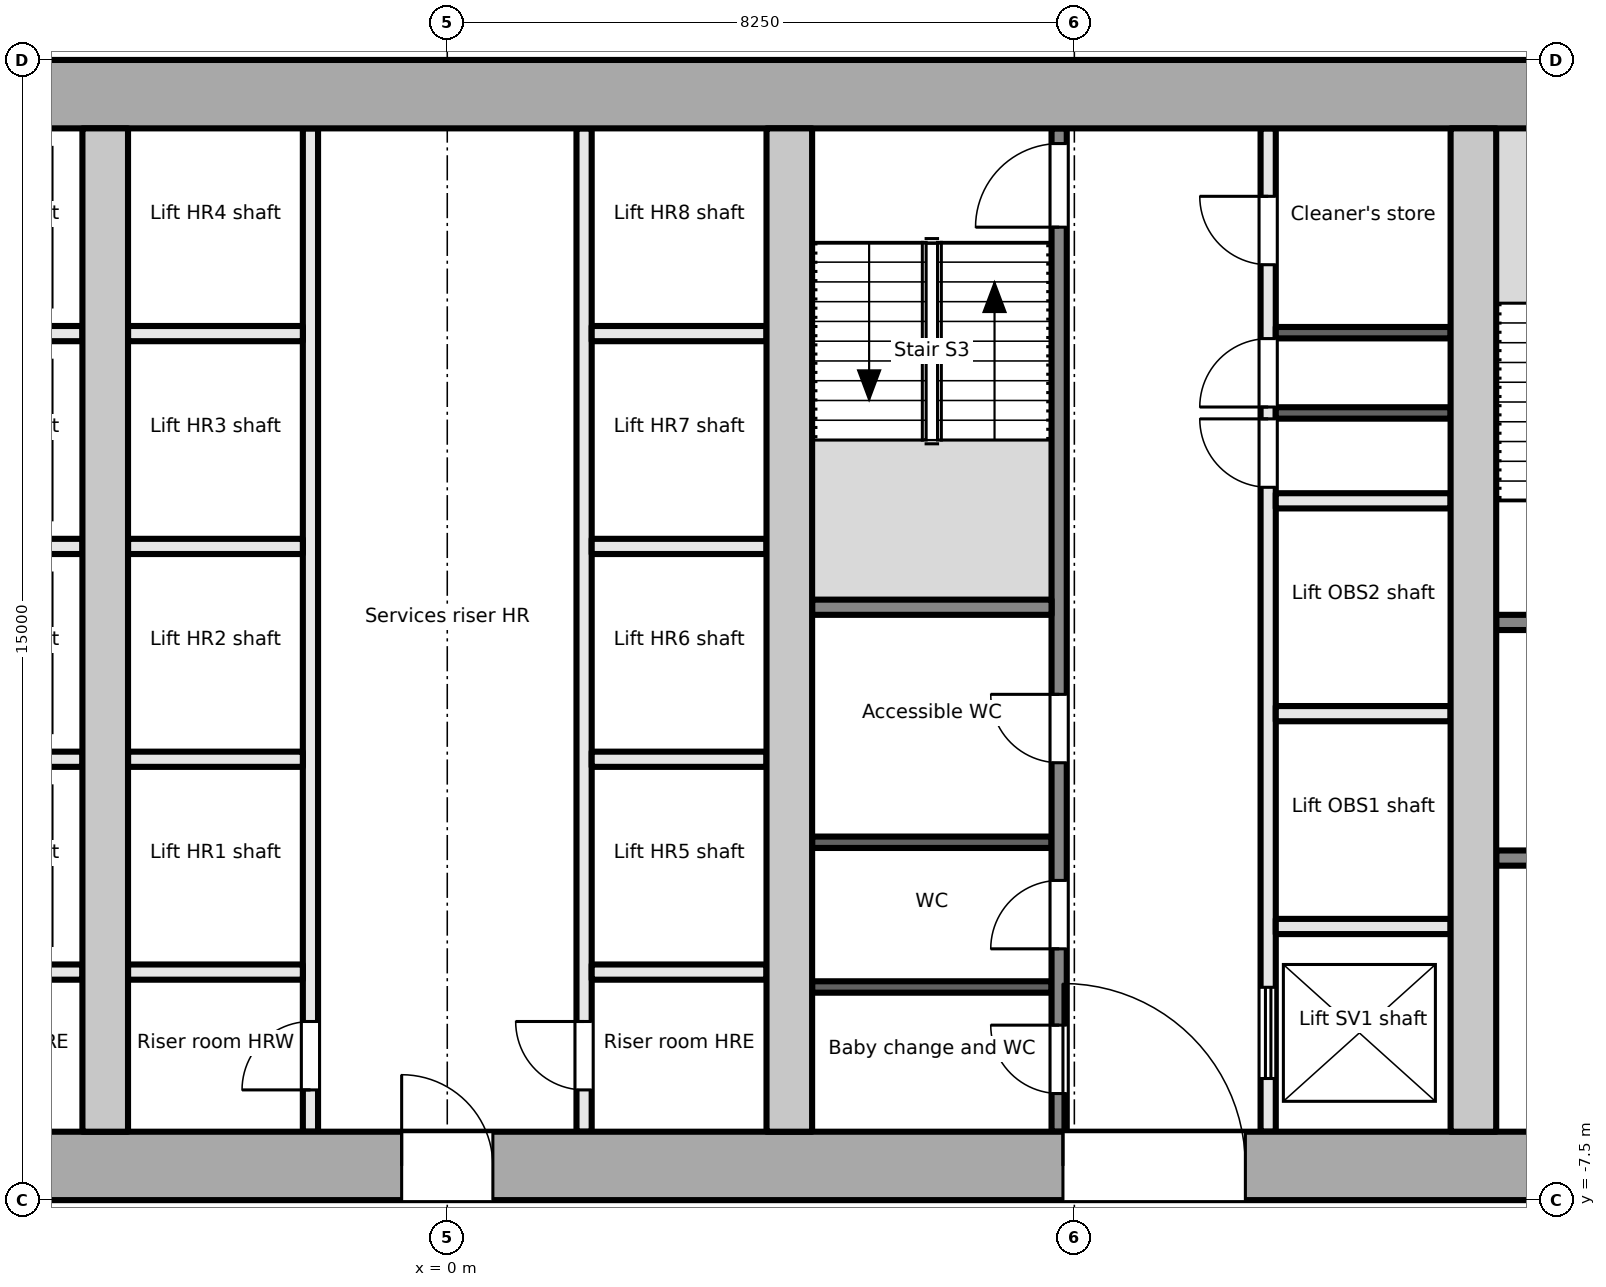
"""IFC4 building model, lengths in metres.
Left out: names, types, materials, properties, quantities, classifications, styles, units other than length and angle.
Written with IfcOpenShell. Run it as: python <this file> out.ifc"""

import sys

from ifc_helpers import new_model, si_unit, direction, frame, frame_2d, origin, place, context, subcontext, project, spatial, rectangle, extrude, element, fill, save


model = new_model("IFC4")
c1 = context("Model", 3, precision=1e-05, world=origin(), true_north=direction((0.0, 1.0)))
c2 = subcontext(c1, "Body", "Model", "MODEL_VIEW")
j1 = project(units=[si_unit("LENGTHUNIT", "METRE"), si_unit("PLANEANGLEUNIT", "RADIAN")], contexts=[c1])
p1 = place(None, origin())
s1 = spatial("IfcSite", under=j1, at=p1, CompositionType="ELEMENT")
p2 = place(p1, origin())
s2 = spatial("IfcBuilding", under=s1, at=p2, CompositionType="ELEMENT")
p3 = place(p2, frame((0.0, 0.0, 48.8)))
s3 = spatial("IfcBuildingStorey", under=s2, at=p3, CompositionType="ELEMENT", Elevation=48.8)
p4 = place(p3, frame((-18.0, -7.05, -0.2), z_axis=(0.0, 0.0, 1.0), x_axis=(1.0, 0.0, 0.0)))
e1 = element("IfcWall", 1, at=p4, inside=s3, PredefinedType="SHEAR", context=c2, shape_type="SweptSolid", body=[
    extrude(rectangle(XDim=36.0, YDim=0.9, at=frame_2d((18.0, 0.0))), origin(), (0.0, 0.0, 1.0), 4.1),
])
p5 = place(p4, frame((7.8, 0.0, 0.2)))
e2 = element("IfcOpeningElement", 2, at=p5, cuts=e1, PredefinedType="OPENING", context=c2, shape_type="SweptSolid", body=[
    extrude(rectangle(XDim=2.4, YDim=2.1, at=frame_2d((1.2, 1.05))), frame((0.0, 0.46, 0.0), z_axis=(0.0, -1.0, 0.0), x_axis=(1.0, 0.0, 0.0)), (0.0, 0.0, 1.0), 0.921),
])
p6 = place(p4, frame((17.4, 0.0, 0.2)))
e3 = element("IfcOpeningElement", 3, at=p6, cuts=e1, PredefinedType="OPENING", context=c2, shape_type="SweptSolid", body=[
    extrude(rectangle(XDim=1.2, YDim=2.1, at=frame_2d((0.6, 1.05))), frame((0.0, 0.46, 0.0), z_axis=(0.0, -1.0, 0.0), x_axis=(1.0, 0.0, 0.0)), (0.0, 0.0, 1.0), 0.921),
])
p7 = place(p4, frame((26.1, 0.0, 0.2)))
e4 = element("IfcOpeningElement", 4, at=p7, cuts=e1, PredefinedType="OPENING", context=c2, shape_type="SweptSolid", body=[
    extrude(rectangle(XDim=2.4, YDim=2.1, at=frame_2d((1.2, 1.05))), frame((0.0, 0.46, 0.0), z_axis=(0.0, -1.0, 0.0), x_axis=(1.0, 0.0, 0.0)), (0.0, 0.0, 1.0), 0.921),
])
p8 = place(p3, frame((-18.0, 7.05, -0.2), z_axis=(0.0, 0.0, 1.0), x_axis=(1.0, 0.0, 0.0)))
e5 = element("IfcWall", 5, at=p8, inside=s3, PredefinedType="SHEAR", context=c2, shape_type="SweptSolid", body=[
    extrude(rectangle(XDim=36.0, YDim=0.9, at=frame_2d((18.0, 0.0))), origin(), (0.0, 0.0, 1.0), 4.1),
])
for number, where, z_axis, x_axis in (
    (6, (-4.5, -6.6, -0.2), (0.0, 0.0, 1.0), (0.0, 1.0, 0.0)),
    (7, (4.5, -6.6, -0.2), (0.0, 0.0, 1.0), (0.0, 1.0, 0.0)),
    (8, (13.5, -6.6, -0.2), (0.0, 0.0, 1.0), (0.0, 1.0, 0.0)),
):
    element("IfcWall", number, at=place(p3, frame(where, z_axis=z_axis, x_axis=x_axis)), inside=s3, PredefinedType="SHEAR", context=c2, shape_type="SweptSolid", body=[
        extrude(rectangle(XDim=13.2, YDim=0.6, at=frame_2d((6.6, 0.0))), origin(), (0.0, 0.0, 1.0), 4.1),
    ])
p9 = place(p3, frame((13.8, -3.0, 0.0), z_axis=(0.0, 0.0, 1.0), x_axis=(1.0, 0.0, 0.0)))
e9 = element("IfcWall", 9, at=p9, inside=s3, PredefinedType="PARTITIONING", context=c2, shape_type="SweptSolid", body=[
    extrude(rectangle(XDim=3.3, YDim=0.2, at=frame_2d((1.65, 0.0))), origin(), (0.0, 0.0, 1.0), 3.9),
])
p10 = place(p9, frame((1.1, 0.0, 0.0)))
e10 = element("IfcOpeningElement", 10, at=p10, cuts=e9, PredefinedType="OPENING", context=c2, shape_type="SweptSolid", body=[
    extrude(rectangle(XDim=1.1, YDim=2.1, at=frame_2d((0.55, 1.05))), frame((0.0, 0.111, 0.0), z_axis=(0.0, -1.0, 0.0), x_axis=(1.0, 0.0, 0.0)), (0.0, 0.0, 1.0), 0.221),
])
p11 = place(p3, frame((13.8, 0.1, 0.0), z_axis=(0.0, 0.0, 1.0), x_axis=(1.0, 0.0, 0.0)))
e11 = element("IfcWall", 11, at=p11, inside=s3, PredefinedType="PARTITIONING", context=c2, shape_type="SweptSolid", body=[
    extrude(rectangle(XDim=3.3, YDim=0.2, at=frame_2d((1.65, 0.0))), origin(), (0.0, 0.0, 1.0), 3.9),
])
p12 = place(p11, frame((1.1, 0.0, 0.0)))
e12 = element("IfcOpeningElement", 12, at=p12, cuts=e11, PredefinedType="OPENING", context=c2, shape_type="SweptSolid", body=[
    extrude(rectangle(XDim=1.1, YDim=2.1, at=frame_2d((0.55, 1.05))), frame((0.0, 0.111, 0.0), z_axis=(0.0, -1.0, 0.0), x_axis=(1.0, 0.0, 0.0)), (0.0, 0.0, 1.0), 0.221),
])
for number, where, z_axis, x_axis in (
    (13, (-7.1, -1.7, 0.0), (0.0, 0.0, 1.0), (1.0, 0.0, 0.0)),
    (14, (-7.1, 1.1, 0.0), (0.0, 0.0, 1.0), (1.0, 0.0, 0.0)),
    (15, (-7.1, 3.9, 0.0), (0.0, 0.0, 1.0), (1.0, 0.0, 0.0)),
    (16, (-7.1, -4.5, 0.0), (0.0, 0.0, 1.0), (1.0, 0.0, 0.0)),
):
    element("IfcWall", number, at=place(p3, frame(where, z_axis=z_axis, x_axis=x_axis)), inside=s3, PredefinedType="PARTITIONING", context=c2, shape_type="SweptSolid", body=[
        extrude(rectangle(XDim=2.3, YDim=0.2, at=frame_2d((1.15, 0.0))), origin(), (0.0, 0.0, 1.0), 3.9),
    ])
p13 = place(p3, frame((-1.8, -6.6, 0.0), z_axis=(0.0, 0.0, 1.0), x_axis=(0.0, 1.0, 0.0)))
e17 = element("IfcWall", 17, at=p13, inside=s3, PredefinedType="PARTITIONING", context=c2, shape_type="SweptSolid", body=[
    extrude(rectangle(XDim=13.2, YDim=0.2, at=frame_2d((6.6, 0.0))), origin(), (0.0, 0.0, 1.0), 3.9),
])
p14 = place(p13, frame((0.55, 0.0, 0.0)))
e18 = element("IfcOpeningElement", 18, at=p14, cuts=e17, PredefinedType="OPENING", context=c2, shape_type="SweptSolid", body=[
    extrude(rectangle(XDim=0.9, YDim=2.1, at=frame_2d((0.45, 1.05))), frame((0.0, 0.111, 0.0), z_axis=(0.0, -1.0, 0.0), x_axis=(1.0, 0.0, 0.0)), (0.0, 0.0, 1.0), 0.221),
])
p15 = place(p3, frame((1.8, -6.6, 0.0), z_axis=(0.0, 0.0, 1.0), x_axis=(0.0, 1.0, 0.0)))
e19 = element("IfcWall", 19, at=p15, inside=s3, PredefinedType="PARTITIONING", context=c2, shape_type="SweptSolid", body=[
    extrude(rectangle(XDim=13.2, YDim=0.2, at=frame_2d((6.6, 0.0))), origin(), (0.0, 0.0, 1.0), 3.9),
])
p16 = place(p15, frame((0.55, 0.0, 0.0)))
e20 = element("IfcOpeningElement", 20, at=p16, cuts=e19, PredefinedType="OPENING", context=c2, shape_type="SweptSolid", body=[
    extrude(rectangle(XDim=0.9, YDim=2.1, at=frame_2d((0.45, 1.05))), frame((0.0, 0.111, 0.0), z_axis=(0.0, -1.0, 0.0), x_axis=(1.0, 0.0, 0.0)), (0.0, 0.0, 1.0), 0.221),
])
for number, where, z_axis, x_axis in (
    (21, (-4.2, -1.7, 0.0), (0.0, 0.0, 1.0), (1.0, 0.0, 0.0)),
    (22, (-4.2, 1.1, 0.0), (0.0, 0.0, 1.0), (1.0, 0.0, 0.0)),
    (23, (-4.2, 3.9, 0.0), (0.0, 0.0, 1.0), (1.0, 0.0, 0.0)),
    (24, (-4.2, -4.5, 0.0), (0.0, 0.0, 1.0), (1.0, 0.0, 0.0)),
    (25, (1.9, -1.7, 0.0), (0.0, 0.0, 1.0), (1.0, 0.0, 0.0)),
    (26, (1.9, 1.1, 0.0), (0.0, 0.0, 1.0), (1.0, 0.0, 0.0)),
    (27, (1.9, 3.9, 0.0), (0.0, 0.0, 1.0), (1.0, 0.0, 0.0)),
    (28, (1.9, -4.5, 0.0), (0.0, 0.0, 1.0), (1.0, 0.0, 0.0)),
):
    element("IfcWall", number, at=place(p3, frame(where, z_axis=z_axis, x_axis=x_axis)), inside=s3, PredefinedType="PARTITIONING", context=c2, shape_type="SweptSolid", body=[
        extrude(rectangle(XDim=2.3, YDim=0.2, at=frame_2d((1.15, 0.0))), origin(), (0.0, 0.0, 1.0), 3.9),
    ])
p17 = place(p3, frame((8.05, -6.6, 0.0), z_axis=(0.0, 0.0, 1.0), x_axis=(0.0, 1.0, 0.0)))
e29 = element("IfcWall", 29, at=p17, inside=s3, PredefinedType="PARTITIONING", context=c2, shape_type="SweptSolid", body=[
    extrude(rectangle(XDim=13.2, YDim=0.2, at=frame_2d((6.6, 0.0))), origin(), (0.0, 0.0, 1.0), 3.9),
])
p18 = place(p17, frame((0.502, 0.0, 0.0)))
e30 = element("IfcOpeningElement", 30, at=p18, cuts=e29, PredefinedType="OPENING", context=c2, shape_type="SweptSolid", body=[
    extrude(rectangle(XDim=0.9, YDim=2.1, at=frame_2d((0.45, 1.05))), frame((0.0, 0.111, 0.0), z_axis=(0.0, -1.0, 0.0), x_axis=(1.0, 0.0, 0.0)), (0.0, 0.0, 1.0), 0.221),
])
p19 = place(p17, frame((2.406, 0.0, 0.0)))
e31 = element("IfcOpeningElement", 31, at=p19, cuts=e29, PredefinedType="OPENING", context=c2, shape_type="SweptSolid", body=[
    extrude(rectangle(XDim=0.9, YDim=2.1, at=frame_2d((0.45, 1.05))), frame((0.0, 0.111, 0.0), z_axis=(0.0, -1.0, 0.0), x_axis=(1.0, 0.0, 0.0)), (0.0, 0.0, 1.0), 0.221),
])
p20 = place(p17, frame((4.854, 0.0, 0.0)))
e32 = element("IfcOpeningElement", 32, at=p20, cuts=e29, PredefinedType="OPENING", context=c2, shape_type="SweptSolid", body=[
    extrude(rectangle(XDim=0.9, YDim=2.1, at=frame_2d((0.45, 1.05))), frame((0.0, 0.111, 0.0), z_axis=(0.0, -1.0, 0.0), x_axis=(1.0, 0.0, 0.0)), (0.0, 0.0, 1.0), 0.221),
])
p21 = place(p17, frame((11.9, 0.0, 0.0)))
e33 = element("IfcOpeningElement", 33, at=p21, cuts=e29, PredefinedType="OPENING", context=c2, shape_type="SweptSolid", body=[
    extrude(rectangle(XDim=1.1, YDim=2.1, at=frame_2d((0.55, 1.05))), frame((0.0, 0.111, 0.0), z_axis=(0.0, -1.0, 0.0), x_axis=(1.0, 0.0, 0.0)), (0.0, 0.0, 1.0), 0.221),
])
p22 = place(p3, frame((10.8, -6.6, 0.0), z_axis=(0.0, 0.0, 1.0), x_axis=(0.0, 1.0, 0.0)))
e34 = element("IfcWall", 34, at=p22, inside=s3, PredefinedType="PARTITIONING", context=c2, shape_type="SweptSolid", body=[
    extrude(rectangle(XDim=13.2, YDim=0.2, at=frame_2d((6.6, 0.0))), origin(), (0.0, 0.0, 1.0), 3.9),
])
p23 = place(p22, frame((0.7, 0.0, 0.0)))
e35 = element("IfcOpeningElement", 35, at=p23, cuts=e34, PredefinedType="OPENING", context=c2, shape_type="SweptSolid", body=[
    extrude(rectangle(XDim=1.2, YDim=2.1, at=frame_2d((0.6, 1.05))), frame((0.0, 0.111, 0.0), z_axis=(0.0, -1.0, 0.0), x_axis=(1.0, 0.0, 0.0)), (0.0, 0.0, 1.0), 0.221),
])
p24 = place(p22, frame((8.478, 0.0, 0.0)))
e36 = element("IfcOpeningElement", 36, at=p24, cuts=e34, PredefinedType="OPENING", context=c2, shape_type="SweptSolid", body=[
    extrude(rectangle(XDim=0.9, YDim=2.1, at=frame_2d((0.45, 1.05))), frame((0.0, 0.111, 0.0), z_axis=(0.0, -1.0, 0.0), x_axis=(1.0, 0.0, 0.0)), (0.0, 0.0, 1.0), 0.221),
])
p25 = place(p22, frame((9.534, 0.0, 0.0)))
e37 = element("IfcOpeningElement", 37, at=p25, cuts=e34, PredefinedType="OPENING", context=c2, shape_type="SweptSolid", body=[
    extrude(rectangle(XDim=0.9, YDim=2.1, at=frame_2d((0.45, 1.05))), frame((0.0, 0.111, 0.0), z_axis=(0.0, -1.0, 0.0), x_axis=(1.0, 0.0, 0.0)), (0.0, 0.0, 1.0), 0.221),
])
p26 = place(p22, frame((11.406, 0.0, 0.0)))
e38 = element("IfcOpeningElement", 38, at=p26, cuts=e34, PredefinedType="OPENING", context=c2, shape_type="SweptSolid", body=[
    extrude(rectangle(XDim=0.9, YDim=2.1, at=frame_2d((0.45, 1.05))), frame((0.0, 0.111, 0.0), z_axis=(0.0, -1.0, 0.0), x_axis=(1.0, 0.0, 0.0)), (0.0, 0.0, 1.0), 0.221),
])
p27 = place(p3, frame((4.8, 0.3, 0.0), z_axis=(0.0, 0.0, 1.0), x_axis=(1.0, 0.0, 0.0)))
e39 = element("IfcWall", 39, at=p27, inside=s3, PredefinedType="PARTITIONING", context=c2, shape_type="SweptSolid", body=[
    extrude(rectangle(XDim=3.15, YDim=0.2, at=frame_2d((1.575, 0.0))), origin(), (0.0, 0.0, 1.0), 3.9),
])
for number, where, z_axis, x_axis in (
    (40, (4.8, -4.696, 0.0), (0.0, 0.0, 1.0), (1.0, 0.0, 0.0)),
    (41, (4.8, -2.792, 0.0), (0.0, 0.0, 1.0), (1.0, 0.0, 0.0)),
):
    element("IfcWall", number, at=place(p3, frame(where, z_axis=z_axis, x_axis=x_axis)), inside=s3, PredefinedType="PARTITIONING", context=c2, shape_type="SweptSolid", body=[
        extrude(rectangle(XDim=3.15, YDim=0.15, at=frame_2d((1.575, 0.0))), origin(), (0.0, 0.0, 1.0), 3.9),
    ])
for number, where, z_axis, x_axis in (
    (42, (10.9, -3.9, 0.0), (0.0, 0.0, 1.0), (1.0, 0.0, 0.0)),
    (43, (10.9, -1.1, 0.0), (0.0, 0.0, 1.0), (1.0, 0.0, 0.0)),
    (44, (10.9, 1.7, 0.0), (0.0, 0.0, 1.0), (1.0, 0.0, 0.0)),
):
    element("IfcWall", number, at=place(p3, frame(where, z_axis=z_axis, x_axis=x_axis)), inside=s3, PredefinedType="PARTITIONING", context=c2, shape_type="SweptSolid", body=[
        extrude(rectangle(XDim=2.3, YDim=0.2, at=frame_2d((1.15, 0.0))), origin(), (0.0, 0.0, 1.0), 3.9),
    ])
for number, where, z_axis, x_axis in (
    (45, (10.9, 2.856, 0.0), (0.0, 0.0, 1.0), (1.0, 0.0, 0.0)),
    (46, (10.9, 3.912, 0.0), (0.0, 0.0, 1.0), (1.0, 0.0, 0.0)),
):
    element("IfcWall", number, at=place(p3, frame(where, z_axis=z_axis, x_axis=x_axis)), inside=s3, PredefinedType="PARTITIONING", context=c2, shape_type="SweptSolid", body=[
        extrude(rectangle(XDim=2.3, YDim=0.15, at=frame_2d((1.15, 0.0))), origin(), (0.0, 0.0, 1.0), 3.9),
    ])
p28 = place(p14, origin())
e47 = element("IfcDoor", 47, at=p28, inside=s3, OperationType="SINGLE_SWING_LEFT", PredefinedType="DOOR", context=c2, shape_type="SweptSolid", body=[
    extrude(rectangle(XDim=0.9, YDim=2.1, at=frame_2d((0.45, 1.05))), frame((0.0, 0.025, 0.0), z_axis=(0.0, -1.0, 0.0), x_axis=(1.0, 0.0, 0.0)), (0.0, 0.0, 1.0), 0.05),
])
fill(e18, e47)
p29 = place(p16, origin())
e48 = element("IfcDoor", 48, at=p29, inside=s3, OperationType="SINGLE_SWING_RIGHT", PredefinedType="DOOR", context=c2, shape_type="SweptSolid", body=[
    extrude(rectangle(XDim=0.9, YDim=2.1, at=frame_2d((0.45, 1.05))), frame((0.0, 0.025, 0.0), z_axis=(0.0, -1.0, 0.0), x_axis=(1.0, 0.0, 0.0)), (0.0, 0.0, 1.0), 0.05),
])
fill(e20, e48)
p30 = place(p6, origin())
e49 = element("IfcDoor", 49, at=p30, inside=s3, OperationType="SINGLE_SWING_LEFT", PredefinedType="DOOR", context=c2, shape_type="SweptSolid", body=[
    extrude(rectangle(XDim=1.2, YDim=2.1, at=frame_2d((0.6, 1.05))), frame((0.0, 0.025, 0.0), z_axis=(0.0, -1.0, 0.0), x_axis=(1.0, 0.0, 0.0)), (0.0, 0.0, 1.0), 0.05),
])
fill(e3, e49)
p31 = place(p18, origin())
e50 = element("IfcDoor", 50, at=p31, inside=s3, OperationType="SINGLE_SWING_RIGHT", PredefinedType="DOOR", context=c2, shape_type="SweptSolid", body=[
    extrude(rectangle(XDim=0.9, YDim=2.1, at=frame_2d((0.45, 1.05))), frame((0.0, 0.025, 0.0), z_axis=(0.0, -1.0, 0.0), x_axis=(1.0, 0.0, 0.0)), (0.0, 0.0, 1.0), 0.05),
])
fill(e30, e50)
p32 = place(p19, origin())
e51 = element("IfcDoor", 51, at=p32, inside=s3, OperationType="SINGLE_SWING_LEFT", PredefinedType="DOOR", context=c2, shape_type="SweptSolid", body=[
    extrude(rectangle(XDim=0.9, YDim=2.1, at=frame_2d((0.45, 1.05))), frame((0.0, 0.025, 0.0), z_axis=(0.0, -1.0, 0.0), x_axis=(1.0, 0.0, 0.0)), (0.0, 0.0, 1.0), 0.05),
])
fill(e31, e51)
p33 = place(p20, origin())
e52 = element("IfcDoor", 52, at=p33, inside=s3, OperationType="SINGLE_SWING_RIGHT", PredefinedType="DOOR", context=c2, shape_type="SweptSolid", body=[
    extrude(rectangle(XDim=0.9, YDim=2.1, at=frame_2d((0.45, 1.05))), frame((0.0, 0.025, 0.0), z_axis=(0.0, -1.0, 0.0), x_axis=(1.0, 0.0, 0.0)), (0.0, 0.0, 1.0), 0.05),
])
fill(e32, e52)
p34 = place(p21, origin())
e53 = element("IfcDoor", 53, at=p34, inside=s3, OperationType="SINGLE_SWING_LEFT", PredefinedType="DOOR", context=c2, shape_type="SweptSolid", body=[
    extrude(rectangle(XDim=1.1, YDim=2.1, at=frame_2d((0.55, 1.05))), frame((0.0, 0.025, 0.0), z_axis=(0.0, -1.0, 0.0), x_axis=(1.0, 0.0, 0.0)), (0.0, 0.0, 1.0), 0.05),
])
fill(e33, e53)
p35 = place(p7, origin())
e54 = element("IfcDoor", 54, at=p35, inside=s3, OperationType="DOUBLE_DOOR_DOUBLE_SWING", PredefinedType="DOOR", context=c2, shape_type="SweptSolid", body=[
    extrude(rectangle(XDim=2.4, YDim=2.1, at=frame_2d((1.2, 1.05))), frame((0.0, 0.025, 0.0), z_axis=(0.0, -1.0, 0.0), x_axis=(1.0, 0.0, 0.0)), (0.0, 0.0, 1.0), 0.05),
])
fill(e4, e54)
p36 = place(p23, origin())
e55 = element("IfcDoor", 55, at=p36, inside=s3, OperationType="DOUBLE_DOOR_SLIDING", PredefinedType="DOOR", context=c2, shape_type="SweptSolid", body=[
    extrude(rectangle(XDim=1.2, YDim=2.1, at=frame_2d((0.6, 1.05))), frame((0.0, 0.025, 0.0), z_axis=(0.0, -1.0, 0.0), x_axis=(1.0, 0.0, 0.0)), (0.0, 0.0, 1.0), 0.05),
])
fill(e35, e55)
p37 = place(p24, origin())
e56 = element("IfcDoor", 56, at=p37, inside=s3, OperationType="SINGLE_SWING_RIGHT", PredefinedType="DOOR", context=c2, shape_type="SweptSolid", body=[
    extrude(rectangle(XDim=0.9, YDim=2.1, at=frame_2d((0.45, 1.05))), frame((0.0, 0.025, 0.0), z_axis=(0.0, -1.0, 0.0), x_axis=(1.0, 0.0, 0.0)), (0.0, 0.0, 1.0), 0.05),
])
fill(e36, e56)
p38 = place(p25, origin())
e57 = element("IfcDoor", 57, at=p38, inside=s3, OperationType="SINGLE_SWING_LEFT", PredefinedType="DOOR", context=c2, shape_type="SweptSolid", body=[
    extrude(rectangle(XDim=0.9, YDim=2.1, at=frame_2d((0.45, 1.05))), frame((0.0, 0.025, 0.0), z_axis=(0.0, -1.0, 0.0), x_axis=(1.0, 0.0, 0.0)), (0.0, 0.0, 1.0), 0.05),
])
fill(e37, e57)
p39 = place(p26, origin())
e58 = element("IfcDoor", 58, at=p39, inside=s3, OperationType="SINGLE_SWING_RIGHT", PredefinedType="DOOR", context=c2, shape_type="SweptSolid", body=[
    extrude(rectangle(XDim=0.9, YDim=2.1, at=frame_2d((0.45, 1.05))), frame((0.0, 0.025, 0.0), z_axis=(0.0, -1.0, 0.0), x_axis=(1.0, 0.0, 0.0)), (0.0, 0.0, 1.0), 0.05),
])
fill(e38, e58)
save(model, sys.argv[1])
